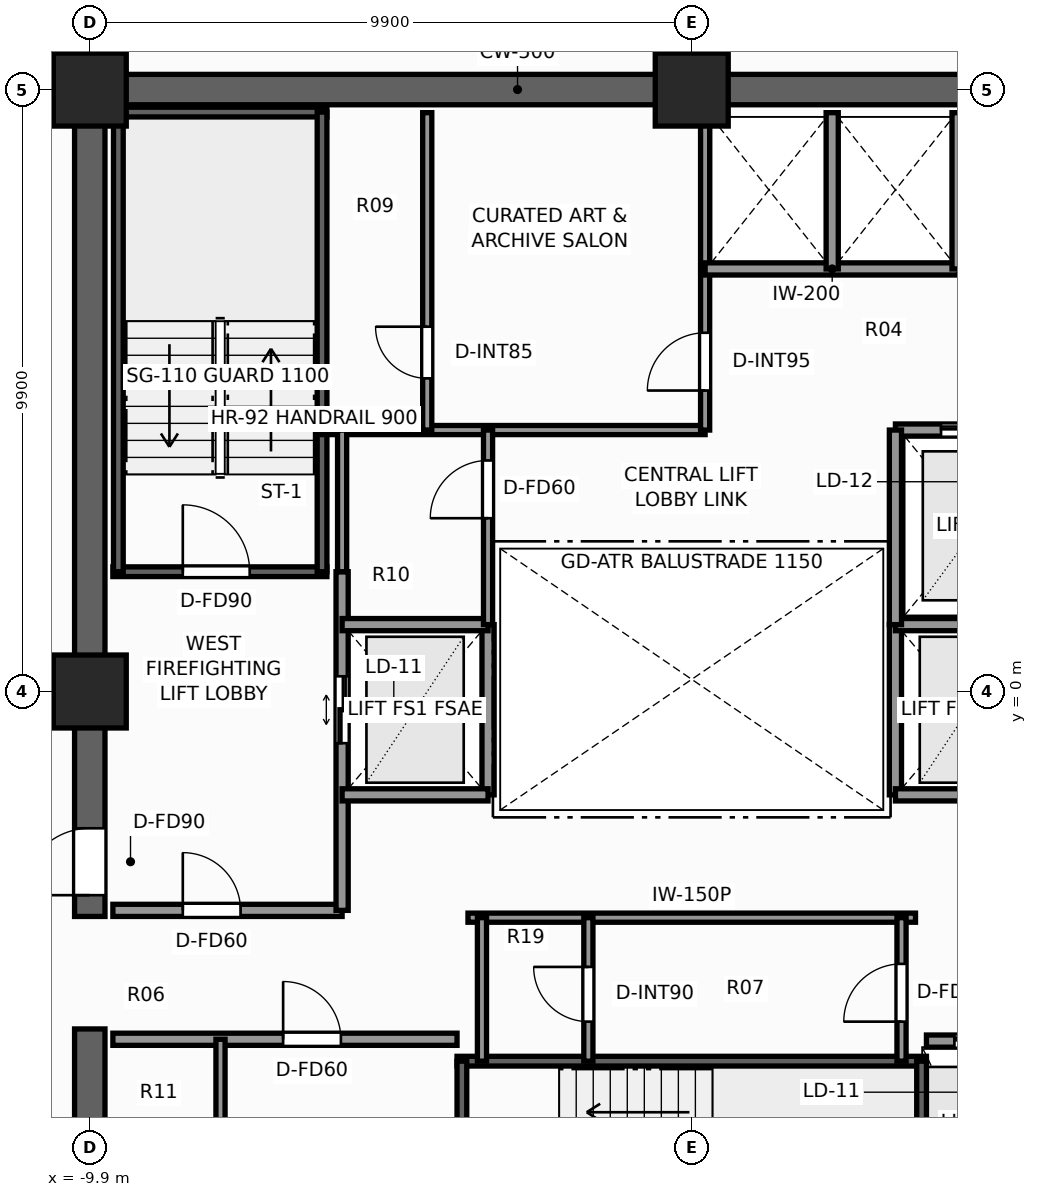
"""IFC4 building model, lengths in metres.
Left out: names, types, materials, properties, quantities, classifications, styles, units other than length and angle.
Written with IfcOpenShell. Run it as: python <this file> out.ifc"""

import sys

from ifc_helpers import new_model, si_unit, direction, frame, frame_2d, origin, origin_2d, place, context, subcontext, project, spatial, rectangle, extrude, element, fill, save


model = new_model("IFC4")
c1 = context("Model", 3, precision=1e-05, world=origin(), true_north=direction((0.0, 1.0)))
c2 = subcontext(c1, "Body", "Model", "MODEL_VIEW")
j1 = project(units=[si_unit("LENGTHUNIT", "METRE"), si_unit("PLANEANGLEUNIT", "RADIAN")], contexts=[c1])
p1 = place(None, origin())
s1 = spatial("IfcSite", under=j1, at=p1, CompositionType="ELEMENT")
p2 = place(p1, origin())
s2 = spatial("IfcBuilding", under=s1, at=p2, CompositionType="ELEMENT")
p3 = place(p2, frame((0.0, 0.0, 160.2)))
s3 = spatial("IfcBuildingStorey", under=s2, at=p3, CompositionType="ELEMENT", Elevation=160.2)
p4 = place(p3, frame((-10.15, 9.9, 0.0), z_axis=(0.0, 0.0, 1.0), x_axis=(1.0, 0.0, 0.0)))
e1 = element("IfcWall", 1, at=p4, inside=s3, PredefinedType="SHEAR", context=c2, shape_type="SweptSolid", body=[
    extrude(rectangle(XDim=14.57, YDim=0.5, at=frame_2d((7.285, 0.0))), origin(), (0.0, 0.0, 1.0), 3.3),
])
p5 = place(p3, frame((-9.9, -9.65, 0.0), z_axis=(0.0, 0.0, 1.0), x_axis=(0.0, 1.0, 0.0)))
e2 = element("IfcWall", 2, at=p5, inside=s3, PredefinedType="SHEAR", context=c2, shape_type="SweptSolid", body=[
    extrude(rectangle(XDim=4.1, YDim=0.5, at=frame_2d((2.05, 0.0))), origin(), (0.0, 0.0, 1.0), 3.3),
])
p6 = place(p3, frame((-9.9, -3.7, 0.0), z_axis=(0.0, 0.0, 1.0), x_axis=(0.0, 1.0, 0.0)))
e3 = element("IfcWall", 3, at=p6, inside=s3, PredefinedType="SHEAR", context=c2, shape_type="SweptSolid", body=[
    extrude(rectangle(XDim=13.35, YDim=0.5, at=frame_2d((6.675, 0.0))), origin(), (0.0, 0.0, 1.0), 3.3),
])
p7 = place(p6, frame((0.35, 0.0, 0.0)))
e4 = element("IfcOpeningElement", 4, at=p7, cuts=e3, PredefinedType="OPENING", context=c2, shape_type="SweptSolid", body=[
    extrude(rectangle(XDim=1.1, YDim=2.2, at=frame_2d((0.55, 1.1))), frame((0.0, 0.26, 0.0), z_axis=(0.0, -1.0, 0.0), x_axis=(1.0, 0.0, 0.0)), (0.0, 0.0, 1.0), 0.52),
])
for number, where, z_axis, x_axis in (
    (5, (-9.9, 9.9, 0.0), (0.0, 0.0, 1.0), (1.0, 0.0, 0.0)),
    (6, (0.0, 9.9, 0.0), (0.0, 0.0, 1.0), (1.0, 0.0, 0.0)),
    (7, (-9.9, 0.0, 0.0), (0.0, 0.0, 1.0), (1.0, 0.0, 0.0)),
):
    element("IfcColumn", number, at=place(p3, frame(where, z_axis=z_axis, x_axis=x_axis)), inside=s3, PredefinedType="COLUMN", context=c2, shape_type="SweptSolid", body=[
        extrude(rectangle(XDim=1.2, YDim=1.2, at=origin_2d()), origin(), (0.0, 0.0, 1.0), 3.3),
    ])
p8 = place(p3, frame((-9.52, 1.97, 0.0), z_axis=(0.0, 0.0, 1.0), x_axis=(1.0, 0.0, 0.0)))
e8 = element("IfcWall", 8, at=p8, inside=s3, PredefinedType="SHEAR", context=c2, shape_type="SweptSolid", body=[
    extrude(rectangle(XDim=3.52, YDim=0.16, at=frame_2d((1.76, 0.0))), origin(), (0.0, 0.0, 1.0), 3.3),
])
p9 = place(p8, frame((1.15, 0.0, 0.0)))
e9 = element("IfcOpeningElement", 9, at=p9, cuts=e8, PredefinedType="OPENING", context=c2, shape_type="SweptSolid", body=[
    extrude(rectangle(XDim=1.1, YDim=2.2, at=frame_2d((0.55, 1.1))), frame((0.0, 0.09, 0.0), z_axis=(0.0, -1.0, 0.0), x_axis=(1.0, 0.0, 0.0)), (0.0, 0.0, 1.0), 0.18),
])
p10 = place(p3, frame((-9.52, 9.53, 0.0), z_axis=(0.0, 0.0, 1.0), x_axis=(1.0, 0.0, 0.0)))
e10 = element("IfcWall", 10, at=p10, inside=s3, PredefinedType="SHEAR", context=c2, shape_type="SweptSolid", body=[
    extrude(rectangle(XDim=3.52, YDim=0.16, at=frame_2d((1.76, 0.0))), origin(), (0.0, 0.0, 1.0), 3.3),
])
for number, where, z_axis, x_axis in (
    (11, (-9.43, 1.97, 0.0), (0.0, 0.0, 1.0), (0.0, 1.0, 0.0)),
    (12, (-6.08, 1.97, 0.0), (0.0, 0.0, 1.0), (0.0, 1.0, 0.0)),
):
    element("IfcWall", number, at=place(p3, frame(where, z_axis=z_axis, x_axis=x_axis)), inside=s3, PredefinedType="SHEAR", context=c2, shape_type="SweptSolid", body=[
        extrude(rectangle(XDim=7.56, YDim=0.16, at=frame_2d((3.78, 0.0))), origin(), (0.0, 0.0, 1.0), 3.3),
    ])
p11 = place(p3, frame((-3.86, -6.08, 0.0), z_axis=(0.0, 0.0, 1.0), x_axis=(1.0, 0.0, 0.0)))
e13 = element("IfcWall", 13, at=p11, inside=s3, PredefinedType="SHEAR", context=c2, shape_type="SweptSolid", body=[
    extrude(rectangle(XDim=7.72, YDim=0.16, at=frame_2d((3.86, 0.0))), origin(), (0.0, 0.0, 1.0), 3.3),
])
for number, where, z_axis, x_axis in (
    (14, (-3.78, -9.43, 0.0), (0.0, 0.0, 1.0), (0.0, 1.0, 0.0)),
    (15, (3.78, -9.43, 0.0), (0.0, 0.0, 1.0), (0.0, 1.0, 0.0)),
):
    element("IfcWall", number, at=place(p3, frame(where, z_axis=z_axis, x_axis=x_axis)), inside=s3, PredefinedType="SHEAR", context=c2, shape_type="SweptSolid", body=[
        extrude(rectangle(XDim=3.35, YDim=0.16, at=frame_2d((1.675, 0.0))), origin(), (0.0, 0.0, 1.0), 3.3),
    ])
p12 = place(p3, frame((-9.52, -3.6, 0.0), z_axis=(0.0, 0.0, 1.0), x_axis=(1.0, 0.0, 0.0)))
e16 = element("IfcWall", 16, at=p12, inside=s3, PredefinedType="SOLIDWALL", context=c2, shape_type="SweptSolid", body=[
    extrude(rectangle(XDim=3.77, YDim=0.2, at=frame_2d((1.885, 0.0))), origin(), (0.0, 0.0, 1.0), 3.1),
])
p13 = place(p12, frame((1.15, 0.0, 0.0)))
e17 = element("IfcOpeningElement", 17, at=p13, cuts=e16, PredefinedType="OPENING", context=c2, shape_type="SweptSolid", body=[
    extrude(rectangle(XDim=0.95, YDim=2.06, at=frame_2d((0.475, 1.03))), frame((0.0, 0.11, 0.0), z_axis=(0.0, -1.0, 0.0), x_axis=(1.0, 0.0, 0.0)), (0.0, 0.0, 1.0), 0.22),
])
p14 = place(p3, frame((-5.75, -3.6, 0.0), z_axis=(0.0, 0.0, 1.0), x_axis=(0.0, 1.0, 0.0)))
e18 = element("IfcWall", 18, at=p14, inside=s3, PredefinedType="SOLIDWALL", context=c2, shape_type="SweptSolid", body=[
    extrude(rectangle(XDim=5.57, YDim=0.2, at=frame_2d((2.785, 0.0))), origin(), (0.0, 0.0, 1.0), 2.735),
])
p15 = place(p14, frame((2.75, 0.0, 0.0)))
e19 = element("IfcOpeningElement", 19, at=p15, cuts=e18, PredefinedType="OPENING", context=c2, shape_type="SweptSolid", body=[
    extrude(rectangle(XDim=1.1, YDim=2.2, at=frame_2d((0.55, 1.1))), frame((0.0, 0.11, 0.0), z_axis=(0.0, -1.0, 0.0), x_axis=(1.0, 0.0, 0.0)), (0.0, 0.0, 1.0), 0.22),
])
p16 = place(p3, frame((-3.35, -1.7, 0.0), z_axis=(0.0, 0.0, 1.0), x_axis=(0.0, 1.0, 0.0)))
e20 = element("IfcWall", 20, at=p16, inside=s3, PredefinedType="SOLIDWALL", context=c2, shape_type="SweptSolid", body=[
    extrude(rectangle(XDim=2.8, YDim=0.2, at=frame_2d((1.4, 0.0))), origin(), (0.0, 0.0, 1.0), 2.735),
])
for number, where, z_axis, x_axis in (
    (21, (-5.75, -1.7, 0.0), (0.0, 0.0, 1.0), (1.0, 0.0, 0.0)),
    (22, (-5.75, 1.1, 0.0), (0.0, 0.0, 1.0), (1.0, 0.0, 0.0)),
):
    element("IfcWall", number, at=place(p3, frame(where, z_axis=z_axis, x_axis=x_axis)), inside=s3, PredefinedType="SOLIDWALL", context=c2, shape_type="SweptSolid", body=[
        extrude(rectangle(XDim=2.4, YDim=0.2, at=frame_2d((1.2, 0.0))), origin(), (0.0, 0.0, 1.0), 3.1),
    ])
p17 = place(p3, frame((3.35, -1.7, 0.0), z_axis=(0.0, 0.0, 1.0), x_axis=(0.0, 1.0, 0.0)))
e23 = element("IfcWall", 23, at=p17, inside=s3, PredefinedType="SOLIDWALL", context=c2, shape_type="SweptSolid", body=[
    extrude(rectangle(XDim=2.8, YDim=0.2, at=frame_2d((1.4, 0.0))), origin(), (0.0, 0.0, 1.0), 2.735),
])
for number, where, z_axis, x_axis in (
    (24, (3.35, -1.7, 0.0), (0.0, 0.0, 1.0), (1.0, 0.0, 0.0)),
    (25, (3.35, 1.1, 0.0), (0.0, 0.0, 1.0), (1.0, 0.0, 0.0)),
):
    element("IfcWall", number, at=place(p3, frame(where, z_axis=z_axis, x_axis=x_axis)), inside=s3, PredefinedType="SOLIDWALL", context=c2, shape_type="SweptSolid", body=[
        extrude(rectangle(XDim=2.4, YDim=0.2, at=frame_2d((1.2, 0.0))), origin(), (0.0, 0.0, 1.0), 3.1),
    ])
p18 = place(p3, frame((3.35, 4.3, 0.0), z_axis=(0.0, 0.0, 1.0), x_axis=(1.0, 0.0, 0.0)))
e26 = element("IfcWall", 26, at=p18, inside=s3, PredefinedType="SOLIDWALL", context=c2, shape_type="SweptSolid", body=[
    extrude(rectangle(XDim=2.73, YDim=0.2, at=frame_2d((1.365, 0.0))), origin(), (0.0, 0.0, 1.0), 3.1),
])
p19 = place(p18, frame((0.75, 0.0, 0.0)))
e27 = element("IfcOpeningElement", 27, at=p19, cuts=e26, PredefinedType="OPENING", context=c2, shape_type="SweptSolid", body=[
    extrude(rectangle(XDim=1.2, YDim=2.25, at=frame_2d((0.6, 1.125))), frame((0.0, 0.11, 0.0), z_axis=(0.0, -1.0, 0.0), x_axis=(1.0, 0.0, 0.0)), (0.0, 0.0, 1.0), 0.22),
])
p20 = place(p3, frame((3.35, 1.1, 0.0), z_axis=(0.0, 0.0, 1.0), x_axis=(0.0, 1.0, 0.0)))
e28 = element("IfcWall", 28, at=p20, inside=s3, PredefinedType="SOLIDWALL", context=c2, shape_type="SweptSolid", body=[
    extrude(rectangle(XDim=3.2, YDim=0.2, at=frame_2d((1.6, 0.0))), origin(), (0.0, 0.0, 1.0), 2.735),
])
p21 = place(p3, frame((-6.08, 4.3, 0.0), z_axis=(0.0, 0.0, 1.0), x_axis=(1.0, 0.0, 0.0)))
e29 = element("IfcWall", 29, at=p21, inside=s3, PredefinedType="PARTITIONING", context=c2, shape_type="SweptSolid", body=[
    extrude(rectangle(XDim=6.3, YDim=0.15, at=frame_2d((3.15, 0.0))), origin(), (0.0, 0.0, 1.0), 3.1),
])
p22 = place(p3, frame((0.22, 4.3, 0.0), z_axis=(0.0, 0.0, 1.0), x_axis=(0.0, 1.0, 0.0)))
e30 = element("IfcWall", 30, at=p22, inside=s3, PredefinedType="PARTITIONING", context=c2, shape_type="SweptSolid", body=[
    extrude(rectangle(XDim=5.22, YDim=0.15, at=frame_2d((2.61, 0.0))), origin(), (0.0, 0.0, 1.0), 3.1),
])
p23 = place(p22, frame((0.65, 0.0, 0.0)))
e31 = element("IfcOpeningElement", 31, at=p23, cuts=e30, PredefinedType="OPENING", context=c2, shape_type="SweptSolid", body=[
    extrude(rectangle(XDim=0.95, YDim=2.06, at=frame_2d((0.475, 1.03))), frame((0.0, 0.085, 0.0), z_axis=(0.0, -1.0, 0.0), x_axis=(1.0, 0.0, 0.0)), (0.0, 0.0, 1.0), 0.17),
])
p24 = place(p3, frame((-4.35, 4.3, 0.0), z_axis=(0.0, 0.0, 1.0), x_axis=(0.0, 1.0, 0.0)))
e32 = element("IfcWall", 32, at=p24, inside=s3, PredefinedType="PARTITIONING", context=c2, shape_type="SweptSolid", body=[
    extrude(rectangle(XDim=5.22, YDim=0.15, at=frame_2d((2.61, 0.0))), origin(), (0.0, 0.0, 1.0), 3.1),
])
p25 = place(p24, frame((0.85, 0.0, 0.0)))
e33 = element("IfcOpeningElement", 33, at=p25, cuts=e32, PredefinedType="OPENING", context=c2, shape_type="SweptSolid", body=[
    extrude(rectangle(XDim=0.85, YDim=2.03, at=frame_2d((0.425, 1.015))), frame((0.0, 0.085, 0.0), z_axis=(0.0, -1.0, 0.0), x_axis=(1.0, 0.0, 0.0)), (0.0, 0.0, 1.0), 0.17),
])
p26 = place(p3, frame((0.22, 6.95, 0.0), z_axis=(0.0, 0.0, 1.0), x_axis=(1.0, 0.0, 0.0)))
e34 = element("IfcWall", 34, at=p26, inside=s3, PredefinedType="SOLIDWALL", context=c2, shape_type="SweptSolid", body=[
    extrude(rectangle(XDim=4.18, YDim=0.2, at=frame_2d((2.09, 0.0))), origin(), (0.0, 0.0, 1.0), 3.1),
])
for number, where, z_axis, x_axis in (
    (35, (4.38, 6.95, 0.0), (0.0, 0.0, 1.0), (0.0, 1.0, 0.0)),
    (36, (2.31, 6.95, 0.0), (0.0, 0.0, 1.0), (0.0, 1.0, 0.0)),
):
    element("IfcWall", number, at=place(p3, frame(where, z_axis=z_axis, x_axis=x_axis)), inside=s3, PredefinedType="SOLIDWALL", context=c2, shape_type="SweptSolid", body=[
        extrude(rectangle(XDim=2.57, YDim=0.2, at=frame_2d((1.285, 0.0))), origin(), (0.0, 0.0, 1.0), 3.1),
    ])
p27 = place(p3, frame((-9.52, -5.72, 0.0), z_axis=(0.0, 0.0, 1.0), x_axis=(1.0, 0.0, 0.0)))
e37 = element("IfcWall", 37, at=p27, inside=s3, PredefinedType="SOLIDWALL", context=c2, shape_type="SweptSolid", body=[
    extrude(rectangle(XDim=5.66, YDim=0.2, at=frame_2d((2.83, 0.0))), origin(), (0.0, 0.0, 1.0), 3.1),
])
p28 = place(p27, frame((2.8, 0.0, 0.0)))
e38 = element("IfcOpeningElement", 38, at=p28, cuts=e37, PredefinedType="OPENING", context=c2, shape_type="SweptSolid", body=[
    extrude(rectangle(XDim=0.95, YDim=2.06, at=frame_2d((0.475, 1.03))), frame((0.0, 0.11, 0.0), z_axis=(0.0, -1.0, 0.0), x_axis=(1.0, 0.0, 0.0)), (0.0, 0.0, 1.0), 0.22),
])
p29 = place(p3, frame((-7.75, -9.52, 0.0), z_axis=(0.0, 0.0, 1.0), x_axis=(0.0, 1.0, 0.0)))
e39 = element("IfcWall", 39, at=p29, inside=s3, PredefinedType="PARTITIONING", context=c2, shape_type="SweptSolid", body=[
    extrude(rectangle(XDim=3.8, YDim=0.15, at=frame_2d((1.9, 0.0))), origin(), (0.0, 0.0, 1.0), 3.1),
])
p30 = place(p29, frame((0.9, 0.0, 0.0)))
e40 = element("IfcOpeningElement", 40, at=p30, cuts=e39, PredefinedType="OPENING", context=c2, shape_type="SweptSolid", body=[
    extrude(rectangle(XDim=0.85, YDim=2.03, at=frame_2d((0.425, 1.015))), frame((0.0, 0.085, 0.0), z_axis=(0.0, -1.0, 0.0), x_axis=(1.0, 0.0, 0.0)), (0.0, 0.0, 1.0), 0.17),
])
p31 = place(p3, frame((3.86, -5.75, 0.0), z_axis=(0.0, 0.0, 1.0), x_axis=(1.0, 0.0, 0.0)))
e41 = element("IfcWall", 41, at=p31, inside=s3, PredefinedType="SOLIDWALL", context=c2, shape_type="SweptSolid", body=[
    extrude(rectangle(XDim=5.66, YDim=0.2, at=frame_2d((2.83, 0.0))), origin(), (0.0, 0.0, 1.0), 3.1),
])
p32 = place(p31, frame((0.46, 0.0, 0.0)))
e42 = element("IfcOpeningElement", 42, at=p32, cuts=e41, PredefinedType="OPENING", context=c2, shape_type="SweptSolid", body=[
    extrude(rectangle(XDim=1.1, YDim=2.2, at=frame_2d((0.55, 1.1))), frame((0.0, 0.11, 0.0), z_axis=(0.0, -1.0, 0.0), x_axis=(1.0, 0.0, 0.0)), (0.0, 0.0, 1.0), 0.22),
])
p33 = place(p31, frame((2.39, 0.0, 0.0)))
e43 = element("IfcOpeningElement", 43, at=p33, cuts=e41, PredefinedType="OPENING", context=c2, shape_type="SweptSolid", body=[
    extrude(rectangle(XDim=1.1, YDim=2.2, at=frame_2d((0.55, 1.1))), frame((0.0, 0.11, 0.0), z_axis=(0.0, -1.0, 0.0), x_axis=(1.0, 0.0, 0.0)), (0.0, 0.0, 1.0), 0.22),
])
p34 = place(p31, frame((4.32, 0.0, 0.0)))
e44 = element("IfcOpeningElement", 44, at=p34, cuts=e41, PredefinedType="OPENING", context=c2, shape_type="SweptSolid", body=[
    extrude(rectangle(XDim=1.1, YDim=2.2, at=frame_2d((0.55, 1.1))), frame((0.0, 0.11, 0.0), z_axis=(0.0, -1.0, 0.0), x_axis=(1.0, 0.0, 0.0)), (0.0, 0.0, 1.0), 0.22),
])
p35 = place(p3, frame((-3.68, -3.72, 0.0), z_axis=(0.0, 0.0, 1.0), x_axis=(1.0, 0.0, 0.0)))
e45 = element("IfcWall", 45, at=p35, inside=s3, PredefinedType="PARTITIONING", context=c2, shape_type="SweptSolid", body=[
    extrude(rectangle(XDim=7.36, YDim=0.15, at=frame_2d((3.68, 0.0))), origin(), (0.0, 0.0, 1.0), 3.1),
])
p36 = place(p3, frame((3.45, -6.08, 0.0), z_axis=(0.0, 0.0, 1.0), x_axis=(0.0, 1.0, 0.0)))
e46 = element("IfcWall", 46, at=p36, inside=s3, PredefinedType="PARTITIONING", context=c2, shape_type="SweptSolid", body=[
    extrude(rectangle(XDim=2.36, YDim=0.15, at=frame_2d((1.18, 0.0))), origin(), (0.0, 0.0, 1.0), 3.1),
])
p37 = place(p36, frame((0.65, 0.0, 0.0)))
e47 = element("IfcOpeningElement", 47, at=p37, cuts=e46, PredefinedType="OPENING", context=c2, shape_type="SweptSolid", body=[
    extrude(rectangle(XDim=0.95, YDim=2.06, at=frame_2d((0.475, 1.03))), frame((0.0, 0.085, 0.0), z_axis=(0.0, -1.0, 0.0), x_axis=(1.0, 0.0, 0.0)), (0.0, 0.0, 1.0), 0.17),
])
p38 = place(p3, frame((-3.45, -6.08, 0.0), z_axis=(0.0, 0.0, 1.0), x_axis=(0.0, 1.0, 0.0)))
e48 = element("IfcWall", 48, at=p38, inside=s3, PredefinedType="PARTITIONING", context=c2, shape_type="SweptSolid", body=[
    extrude(rectangle(XDim=2.36, YDim=0.15, at=frame_2d((1.18, 0.0))), origin(), (0.0, 0.0, 1.0), 3.1),
])
p39 = place(p3, frame((-1.7, -6.08, 0.0), z_axis=(0.0, 0.0, 1.0), x_axis=(0.0, 1.0, 0.0)))
e49 = element("IfcWall", 49, at=p39, inside=s3, PredefinedType="PARTITIONING", context=c2, shape_type="SweptSolid", body=[
    extrude(rectangle(XDim=2.36, YDim=0.15, at=frame_2d((1.18, 0.0))), origin(), (0.0, 0.0, 1.0), 3.1),
])
p40 = place(p39, frame((0.65, 0.0, 0.0)))
e50 = element("IfcOpeningElement", 50, at=p40, cuts=e49, PredefinedType="OPENING", context=c2, shape_type="SweptSolid", body=[
    extrude(rectangle(XDim=0.9, YDim=2.06, at=frame_2d((0.45, 1.03))), frame((0.0, 0.085, 0.0), z_axis=(0.0, -1.0, 0.0), x_axis=(1.0, 0.0, 0.0)), (0.0, 0.0, 1.0), 0.17),
])
p41 = place(p3, frame((-3.35, 1.1, 0.0), z_axis=(0.0, 0.0, 1.0), x_axis=(0.0, 1.0, 0.0)))
e51 = element("IfcWall", 51, at=p41, inside=s3, PredefinedType="PARTITIONING", context=c2, shape_type="SweptSolid", body=[
    extrude(rectangle(XDim=3.2, YDim=0.15, at=frame_2d((1.6, 0.0))), origin(), (0.0, 0.0, 1.0), 2.735),
])
p42 = place(p41, frame((1.75, 0.0, 0.0)))
e52 = element("IfcOpeningElement", 52, at=p42, cuts=e51, PredefinedType="OPENING", context=c2, shape_type="SweptSolid", body=[
    extrude(rectangle(XDim=0.95, YDim=2.06, at=frame_2d((0.475, 1.03))), frame((0.0, 0.085, 0.0), z_axis=(0.0, -1.0, 0.0), x_axis=(1.0, 0.0, 0.0)), (0.0, 0.0, 1.0), 0.17),
])
p43 = place(p3, frame((-5.75, 1.97, 0.0), z_axis=(0.0, 0.0, 1.0), x_axis=(0.0, 1.0, 0.0)))
e53 = element("IfcWall", 53, at=p43, inside=s3, PredefinedType="PARTITIONING", context=c2, shape_type="SweptSolid", body=[
    extrude(rectangle(XDim=2.33, YDim=0.15, at=frame_2d((1.165, 0.0))), origin(), (0.0, 0.0, 1.0), 2.735),
])
p44 = place(p9, origin())
e54 = element("IfcDoor", 54, at=p44, inside=s3, OperationType="SINGLE_SWING_LEFT", PredefinedType="DOOR", context=c2, shape_type="SweptSolid", body=[
    extrude(rectangle(XDim=1.1, YDim=2.2, at=frame_2d((0.55, 1.1))), frame((0.0, 0.025, 0.0), z_axis=(0.0, -1.0, 0.0), x_axis=(1.0, 0.0, 0.0)), (0.0, 0.0, 1.0), 0.05),
])
fill(e9, e54)
p45 = place(p7, origin())
e55 = element("IfcDoor", 55, at=p45, inside=s3, OperationType="SINGLE_SWING_LEFT", PredefinedType="DOOR", context=c2, shape_type="SweptSolid", body=[
    extrude(rectangle(XDim=1.1, YDim=2.2, at=frame_2d((0.55, 1.1))), frame((0.0, 0.025, 0.0), z_axis=(0.0, -1.0, 0.0), x_axis=(1.0, 0.0, 0.0)), (0.0, 0.0, 1.0), 0.05),
])
fill(e4, e55)
p46 = place(p15, origin())
e56 = element("IfcDoor", 56, at=p46, inside=s3, OperationType="DOUBLE_DOOR_SLIDING", PredefinedType="DOOR", context=c2, shape_type="SweptSolid", body=[
    extrude(rectangle(XDim=1.1, YDim=2.2, at=frame_2d((0.55, 1.1))), frame((0.0, 0.025, 0.0), z_axis=(0.0, -1.0, 0.0), x_axis=(1.0, 0.0, 0.0)), (0.0, 0.0, 1.0), 0.05),
])
fill(e19, e56)
p47 = place(p19, origin())
e57 = element("IfcDoor", 57, at=p47, inside=s3, OperationType="DOUBLE_DOOR_SLIDING", PredefinedType="DOOR", context=c2, shape_type="SweptSolid", body=[
    extrude(rectangle(XDim=1.2, YDim=2.25, at=frame_2d((0.6, 1.125))), frame((0.0, 0.025, 0.0), z_axis=(0.0, -1.0, 0.0), x_axis=(1.0, 0.0, 0.0)), (0.0, 0.0, 1.0), 0.05),
])
fill(e27, e57)
p48 = place(p23, origin())
e58 = element("IfcDoor", 58, at=p48, inside=s3, OperationType="SINGLE_SWING_LEFT", PredefinedType="DOOR", context=c2, shape_type="SweptSolid", body=[
    extrude(rectangle(XDim=0.95, YDim=2.06, at=frame_2d((0.475, 1.03))), frame((0.0, 0.025, 0.0), z_axis=(0.0, -1.0, 0.0), x_axis=(1.0, 0.0, 0.0)), (0.0, 0.0, 1.0), 0.05),
])
fill(e31, e58)
p49 = place(p25, origin())
e59 = element("IfcDoor", 59, at=p49, inside=s3, OperationType="SINGLE_SWING_RIGHT", PredefinedType="DOOR", context=c2, shape_type="SweptSolid", body=[
    extrude(rectangle(XDim=0.85, YDim=2.03, at=frame_2d((0.425, 1.015))), frame((0.0, 0.025, 0.0), z_axis=(0.0, -1.0, 0.0), x_axis=(1.0, 0.0, 0.0)), (0.0, 0.0, 1.0), 0.05),
])
fill(e33, e59)
p50 = place(p28, origin())
e60 = element("IfcDoor", 60, at=p50, inside=s3, OperationType="SINGLE_SWING_LEFT", PredefinedType="DOOR", context=c2, shape_type="SweptSolid", body=[
    extrude(rectangle(XDim=0.95, YDim=2.06, at=frame_2d((0.475, 1.03))), frame((0.0, 0.025, 0.0), z_axis=(0.0, -1.0, 0.0), x_axis=(1.0, 0.0, 0.0)), (0.0, 0.0, 1.0), 0.05),
])
fill(e38, e60)
p51 = place(p13, origin())
e61 = element("IfcDoor", 61, at=p51, inside=s3, OperationType="SINGLE_SWING_LEFT", PredefinedType="DOOR", context=c2, shape_type="SweptSolid", body=[
    extrude(rectangle(XDim=0.95, YDim=2.06, at=frame_2d((0.475, 1.03))), frame((0.0, 0.025, 0.0), z_axis=(0.0, -1.0, 0.0), x_axis=(1.0, 0.0, 0.0)), (0.0, 0.0, 1.0), 0.05),
])
fill(e17, e61)
p52 = place(p32, origin())
e62 = element("IfcDoor", 62, at=p52, inside=s3, OperationType="DOUBLE_DOOR_SLIDING", PredefinedType="DOOR", context=c2, shape_type="SweptSolid", body=[
    extrude(rectangle(XDim=1.1, YDim=2.2, at=frame_2d((0.55, 1.1))), frame((0.0, 0.025, 0.0), z_axis=(0.0, -1.0, 0.0), x_axis=(1.0, 0.0, 0.0)), (0.0, 0.0, 1.0), 0.05),
])
fill(e42, e62)
p53 = place(p37, origin())
e63 = element("IfcDoor", 63, at=p53, inside=s3, OperationType="SINGLE_SWING_LEFT", PredefinedType="DOOR", context=c2, shape_type="SweptSolid", body=[
    extrude(rectangle(XDim=0.95, YDim=2.06, at=frame_2d((0.475, 1.03))), frame((0.0, 0.025, 0.0), z_axis=(0.0, -1.0, 0.0), x_axis=(1.0, 0.0, 0.0)), (0.0, 0.0, 1.0), 0.05),
])
fill(e47, e63)
p54 = place(p40, origin())
e64 = element("IfcDoor", 64, at=p54, inside=s3, OperationType="SINGLE_SWING_RIGHT", PredefinedType="DOOR", context=c2, shape_type="SweptSolid", body=[
    extrude(rectangle(XDim=0.9, YDim=2.06, at=frame_2d((0.45, 1.03))), frame((0.0, 0.025, 0.0), z_axis=(0.0, -1.0, 0.0), x_axis=(1.0, 0.0, 0.0)), (0.0, 0.0, 1.0), 0.05),
])
fill(e50, e64)
p55 = place(p42, origin())
e65 = element("IfcDoor", 65, at=p55, inside=s3, OperationType="SINGLE_SWING_LEFT", PredefinedType="DOOR", context=c2, shape_type="SweptSolid", body=[
    extrude(rectangle(XDim=0.95, YDim=2.06, at=frame_2d((0.475, 1.03))), frame((0.0, 0.025, 0.0), z_axis=(0.0, -1.0, 0.0), x_axis=(1.0, 0.0, 0.0)), (0.0, 0.0, 1.0), 0.05),
])
fill(e52, e65)
save(model, sys.argv[1])
